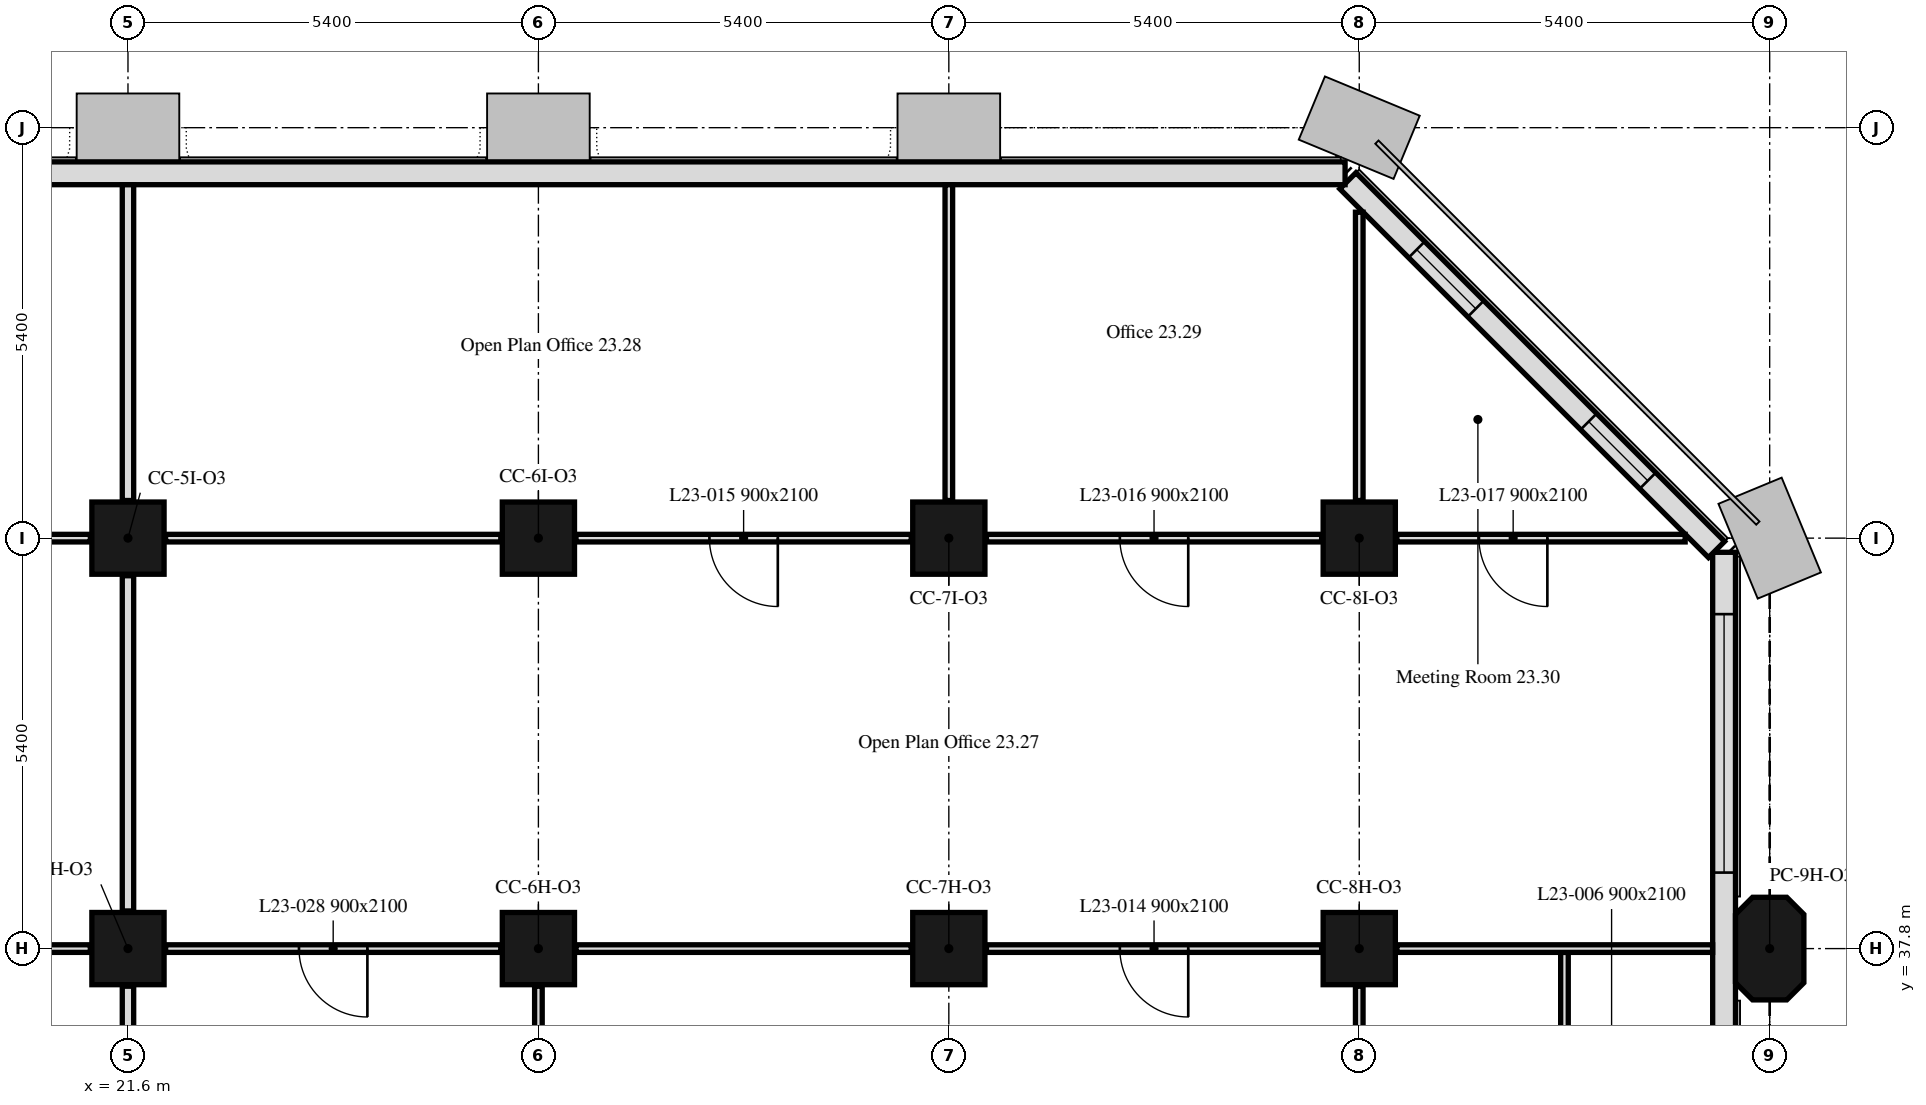
"""IFC4 building model, lengths in metres.
Left out: names, types, materials, properties, quantities, classifications, styles, units other than length and angle.
Written with IfcOpenShell. Run it as: python <this file> out.ifc"""

import sys

from ifc_helpers import new_model, si_unit, direction, frame, frame_2d, origin, origin_2d, place, context, subcontext, project, spatial, polyline, rectangle, outline, extrude, element, fill, save


model = new_model("IFC4")
c1 = context("Model", 3, precision=1e-05, world=origin(), true_north=direction((0.0, 1.0)))
c2 = subcontext(c1, "Body", "Model", "MODEL_VIEW")
j1 = project(units=[si_unit("LENGTHUNIT", "METRE"), si_unit("PLANEANGLEUNIT", "RADIAN")], contexts=[c1])
p1 = place(None, origin())
s1 = spatial("IfcSite", under=j1, at=p1, CompositionType="ELEMENT")
p2 = place(p1, origin())
s2 = spatial("IfcBuilding", under=s1, at=p2, CompositionType="ELEMENT")
p3 = place(p2, frame((0.0, 0.0, 99.2)))
s3 = spatial("IfcBuildingStorey", under=s2, at=p3, CompositionType="ELEMENT", Elevation=99.2)
for number, where, z_axis, x_axis in (
    (1, (21.6, 37.8, 0.0), (0.0, 0.0, 1.0), (1.0, 0.0, 0.0)),
    (2, (27.0, 37.8, 0.0), (0.0, 0.0, 1.0), (1.0, 0.0, 0.0)),
    (3, (32.4, 37.8, 0.0), (0.0, 0.0, 1.0), (1.0, 0.0, 0.0)),
    (4, (37.8, 37.8, 0.0), (0.0, 0.0, 1.0), (1.0, 0.0, 0.0)),
):
    element("IfcColumn", number, at=place(p3, frame(where, z_axis=z_axis, x_axis=x_axis)), inside=s3, PredefinedType="COLUMN", context=c2, shape_type="SweptSolid", body=[
        extrude(rectangle(XDim=0.95, YDim=0.95, at=origin_2d()), origin(), (0.0, 0.0, 1.0), 3.5),
    ])
p4 = place(p3, frame((43.2, 37.8, 0.0), z_axis=(0.0, 0.0, 1.0), x_axis=(0.0, 1.0, 0.0)))
e5 = element("IfcColumn", 5, at=p4, inside=s3, PredefinedType="COLUMN", context=c2, shape_type="SweptSolid", body=[
    extrude(outline(polyline([(-0.45, -0.45), (0.45, -0.45), (0.675, -0.225), (0.675, 0.225), (0.45, 0.45), (-0.45, 0.45), (-0.675, 0.225), (-0.675, -0.225), (-0.45, -0.45)])), origin(), (0.0, 0.0, 1.0), 3.5),
])
for number, where, z_axis, x_axis in (
    (6, (21.6, 43.2, 0.0), (0.0, 0.0, 1.0), (1.0, 0.0, 0.0)),
    (7, (27.0, 43.2, 0.0), (0.0, 0.0, 1.0), (1.0, 0.0, 0.0)),
    (8, (32.4, 43.2, 0.0), (0.0, 0.0, 1.0), (1.0, 0.0, 0.0)),
    (9, (37.8, 43.2, 0.0), (0.0, 0.0, 1.0), (1.0, 0.0, 0.0)),
):
    element("IfcColumn", number, at=place(p3, frame(where, z_axis=z_axis, x_axis=x_axis)), inside=s3, PredefinedType="COLUMN", context=c2, shape_type="SweptSolid", body=[
        extrude(rectangle(XDim=0.95, YDim=0.95, at=origin_2d()), origin(), (0.0, 0.0, 1.0), 3.5),
    ])
p5 = place(p3, frame((42.6, 32.4, 0.0), z_axis=(0.0, 0.0, 1.0), x_axis=(0.0, 1.0, 0.0)))
e10 = element("IfcWall", 10, at=p5, inside=s3, PredefinedType="SOLIDWALL", context=c2, shape_type="SweptSolid", body=[
    extrude(rectangle(XDim=10.614, YDim=0.3, at=frame_2d((5.307, 0.0))), origin(), (0.0, 0.0, 1.0), 3.5),
])
p6 = place(p5, frame((6.4, 0.0, 0.9)))
e11 = element("IfcOpeningElement", 11, at=p6, cuts=e10, PredefinedType="OPENING", context=c2, shape_type="SweptSolid", body=[
    extrude(rectangle(XDim=3.4, YDim=1.7, at=frame_2d((1.7, 0.85))), frame((0.0, 0.16, 0.0), z_axis=(0.0, -1.0, 0.0), x_axis=(1.0, 0.0, 0.0)), (0.0, 0.0, 1.0), 0.32),
])
p7 = place(p3, frame((42.501, 43.051, 0.0), z_axis=(0.0, 0.0, 1.0), x_axis=(-0.707106781187, 0.707106781187, 0.0)))
e12 = element("IfcWall", 12, at=p7, inside=s3, PredefinedType="SOLIDWALL", context=c2, shape_type="SweptSolid", body=[
    extrude(rectangle(XDim=6.86, YDim=0.3, at=frame_2d((3.43, 0.0))), origin(), (0.0, 0.0, 1.0), 3.5),
])
p8 = place(p7, frame((1.28, 0.0, 0.9)))
e13 = element("IfcOpeningElement", 13, at=p8, cuts=e12, PredefinedType="OPENING", context=c2, shape_type="SweptSolid", body=[
    extrude(rectangle(XDim=1.1, YDim=1.7, at=frame_2d((0.55, 0.85))), frame((0.0, 0.16, 0.0), z_axis=(0.0, -1.0, 0.0), x_axis=(1.0, 0.0, 0.0)), (0.0, 0.0, 1.0), 0.32),
])
p9 = place(p7, frame((4.48, 0.0, 0.9)))
e14 = element("IfcOpeningElement", 14, at=p9, cuts=e12, PredefinedType="OPENING", context=c2, shape_type="SweptSolid", body=[
    extrude(rectangle(XDim=1.1, YDim=1.7, at=frame_2d((0.55, 0.85))), frame((0.0, 0.16, 0.0), z_axis=(0.0, -1.0, 0.0), x_axis=(1.0, 0.0, 0.0)), (0.0, 0.0, 1.0), 0.32),
])
p10 = place(p3, frame((37.614, 48.0, 0.0), z_axis=(0.0, 0.0, 1.0), x_axis=(-1.0, 0.0, 0.0)))
e15 = element("IfcWall", 15, at=p10, inside=s3, PredefinedType="SOLIDWALL", context=c2, shape_type="SweptSolid", body=[
    extrude(rectangle(XDim=32.027, YDim=0.3, at=frame_2d((16.014, 0.0))), origin(), (0.0, 0.0, 1.0), 3.5),
])
p11 = place(p10, frame((27.814, 0.0, 0.9)))
e16 = element("IfcOpeningElement", 16, at=p11, cuts=e15, PredefinedType="OPENING", context=c2, shape_type="SweptSolid", body=[
    extrude(rectangle(XDim=3.4, YDim=1.7, at=frame_2d((1.7, 0.85))), frame((0.0, 0.16, 0.0), z_axis=(0.0, -1.0, 0.0), x_axis=(1.0, 0.0, 0.0)), (0.0, 0.0, 1.0), 0.32),
])
p12 = place(p3, frame((21.6, 35.175, 0.0), z_axis=(0.0, 0.0, 1.0), x_axis=(0.0, 1.0, 0.0)))
e17 = element("IfcWall", 17, at=p12, inside=s3, PredefinedType="PARTITIONING", context=c2, shape_type="SweptSolid", body=[
    extrude(rectangle(XDim=2.13, YDim=0.15, at=frame_2d((1.065, 0.0))), origin(), (0.0, 0.0, 1.0), 2.75),
])
p13 = place(p3, frame((21.105, 37.8, 0.0), z_axis=(0.0, 0.0, 1.0), x_axis=(-1.0, 0.0, 0.0)))
e18 = element("IfcWall", 18, at=p13, inside=s3, PredefinedType="PARTITIONING", context=c2, shape_type="SweptSolid", body=[
    extrude(rectangle(XDim=4.41, YDim=0.1, at=frame_2d((2.205, 0.0))), origin(), (0.0, 0.0, 1.0), 3.5),
])
p14 = place(p3, frame((21.6, 38.295, 0.0), z_axis=(0.0, 0.0, 1.0), x_axis=(0.0, 1.0, 0.0)))
e19 = element("IfcWall", 19, at=p14, inside=s3, PredefinedType="PARTITIONING", context=c2, shape_type="SweptSolid", body=[
    extrude(rectangle(XDim=4.41, YDim=0.15, at=frame_2d((2.205, 0.0))), origin(), (0.0, 0.0, 1.0), 2.75),
])
p15 = place(p3, frame((21.105, 43.2, 0.0), z_axis=(0.0, 0.0, 1.0), x_axis=(-1.0, 0.0, 0.0)))
e20 = element("IfcWall", 20, at=p15, inside=s3, PredefinedType="PARTITIONING", context=c2, shape_type="SweptSolid", body=[
    extrude(rectangle(XDim=4.41, YDim=0.1, at=frame_2d((2.205, 0.0))), origin(), (0.0, 0.0, 1.0), 3.5),
])
p16 = place(p15, frame((1.755, 0.0, 0.0)))
e21 = element("IfcOpeningElement", 21, at=p16, cuts=e20, PredefinedType="OPENING", context=c2, shape_type="SweptSolid", body=[
    extrude(rectangle(XDim=0.9, YDim=2.1, at=frame_2d((0.45, 1.05))), frame((0.0, 0.05, 0.0), z_axis=(0.0, -1.0, 0.0), x_axis=(1.0, 0.0, 0.0)), (0.0, 0.0, 1.0), 0.1),
])
p17 = place(p3, frame((21.6, 47.849, 0.0), z_axis=(0.0, 0.0, 1.0), x_axis=(0.0, -1.0, 0.0)))
e22 = element("IfcWall", 22, at=p17, inside=s3, PredefinedType="PARTITIONING", context=c2, shape_type="SweptSolid", body=[
    extrude(rectangle(XDim=4.154, YDim=0.15, at=frame_2d((2.077, 0.0))), origin(), (0.0, 0.0, 1.0), 2.75),
])
p18 = place(p3, frame((27.0, 35.175, 0.0), z_axis=(0.0, 0.0, 1.0), x_axis=(0.0, 1.0, 0.0)))
e23 = element("IfcWall", 23, at=p18, inside=s3, PredefinedType="PARTITIONING", context=c2, shape_type="SweptSolid", body=[
    extrude(rectangle(XDim=2.13, YDim=0.1, at=frame_2d((1.065, 0.0))), origin(), (0.0, 0.0, 1.0), 2.75),
])
p19 = place(p3, frame((26.505, 37.8, 0.0), z_axis=(0.0, 0.0, 1.0), x_axis=(-1.0, 0.0, 0.0)))
e24 = element("IfcWall", 24, at=p19, inside=s3, PredefinedType="PARTITIONING", context=c2, shape_type="SweptSolid", body=[
    extrude(rectangle(XDim=4.41, YDim=0.1, at=frame_2d((2.205, 0.0))), origin(), (0.0, 0.0, 1.0), 3.5),
])
p20 = place(p19, frame((1.755, 0.0, 0.0)))
e25 = element("IfcOpeningElement", 25, at=p20, cuts=e24, PredefinedType="OPENING", context=c2, shape_type="SweptSolid", body=[
    extrude(rectangle(XDim=0.9, YDim=2.1, at=frame_2d((0.45, 1.05))), frame((0.0, 0.05, 0.0), z_axis=(0.0, -1.0, 0.0), x_axis=(1.0, 0.0, 0.0)), (0.0, 0.0, 1.0), 0.1),
])
p21 = place(p3, frame((37.8, 35.175, 0.0), z_axis=(0.0, 0.0, 1.0), x_axis=(0.0, 1.0, 0.0)))
e26 = element("IfcWall", 26, at=p21, inside=s3, PredefinedType="PARTITIONING", context=c2, shape_type="SweptSolid", body=[
    extrude(rectangle(XDim=2.13, YDim=0.1, at=frame_2d((1.065, 0.0))), origin(), (0.0, 0.0, 1.0), 3.5),
])
p22 = place(p3, frame((37.305, 37.8, 0.0), z_axis=(0.0, 0.0, 1.0), x_axis=(-1.0, 0.0, 0.0)))
e27 = element("IfcWall", 27, at=p22, inside=s3, PredefinedType="PARTITIONING", context=c2, shape_type="SweptSolid", body=[
    extrude(rectangle(XDim=4.41, YDim=0.1, at=frame_2d((2.205, 0.0))), origin(), (0.0, 0.0, 1.0), 3.5),
])
p23 = place(p22, frame((1.755, 0.0, 0.0)))
e28 = element("IfcOpeningElement", 28, at=p23, cuts=e27, PredefinedType="OPENING", context=c2, shape_type="SweptSolid", body=[
    extrude(rectangle(XDim=0.9, YDim=2.1, at=frame_2d((0.45, 1.05))), frame((0.0, 0.05, 0.0), z_axis=(0.0, -1.0, 0.0), x_axis=(1.0, 0.0, 0.0)), (0.0, 0.0, 1.0), 0.1),
])
p24 = place(p3, frame((31.905, 37.8, 0.0), z_axis=(0.0, 0.0, 1.0), x_axis=(-1.0, 0.0, 0.0)))
e29 = element("IfcWall", 29, at=p24, inside=s3, PredefinedType="PARTITIONING", context=c2, shape_type="SweptSolid", body=[
    extrude(rectangle(XDim=4.41, YDim=0.1, at=frame_2d((2.205, 0.0))), origin(), (0.0, 0.0, 1.0), 3.5),
])
p25 = place(p3, frame((40.5, 35.175, 0.0), z_axis=(0.0, 0.0, 1.0), x_axis=(0.0, 1.0, 0.0)))
e30 = element("IfcWall", 30, at=p25, inside=s3, PredefinedType="PARTITIONING", context=c2, shape_type="SweptSolid", body=[
    extrude(rectangle(XDim=2.575, YDim=0.1, at=frame_2d((1.288, 0.0))), origin(), (0.0, 0.0, 1.0), 3.5),
])
p26 = place(p3, frame((42.449, 37.8, 0.0), z_axis=(0.0, 0.0, 1.0), x_axis=(-1.0, 0.0, 0.0)))
e31 = element("IfcWall", 31, at=p26, inside=s3, PredefinedType="PARTITIONING", context=c2, shape_type="SweptSolid", body=[
    extrude(rectangle(XDim=4.154, YDim=0.1, at=frame_2d((2.077, 0.0))), origin(), (0.0, 0.0, 1.0), 3.5),
])
p27 = place(p3, frame((42.088, 43.2, 0.0), z_axis=(0.0, 0.0, 1.0), x_axis=(-1.0, 0.0, 0.0)))
e32 = element("IfcWall", 32, at=p27, inside=s3, PredefinedType="PARTITIONING", context=c2, shape_type="SweptSolid", body=[
    extrude(rectangle(XDim=3.793, YDim=0.1, at=frame_2d((1.896, 0.0))), origin(), (0.0, 0.0, 1.0), 3.5),
])
p28 = place(p27, frame((1.813, 0.0, 0.0)))
e33 = element("IfcOpeningElement", 33, at=p28, cuts=e32, PredefinedType="OPENING", context=c2, shape_type="SweptSolid", body=[
    extrude(rectangle(XDim=0.9, YDim=2.1, at=frame_2d((0.45, 1.05))), frame((0.0, 0.05, 0.0), z_axis=(0.0, -1.0, 0.0), x_axis=(1.0, 0.0, 0.0)), (0.0, 0.0, 1.0), 0.1),
])
p29 = place(p3, frame((37.305, 43.2, 0.0), z_axis=(0.0, 0.0, 1.0), x_axis=(-1.0, 0.0, 0.0)))
e34 = element("IfcWall", 34, at=p29, inside=s3, PredefinedType="PARTITIONING", context=c2, shape_type="SweptSolid", body=[
    extrude(rectangle(XDim=4.41, YDim=0.1, at=frame_2d((2.205, 0.0))), origin(), (0.0, 0.0, 1.0), 3.5),
])
p30 = place(p29, frame((1.755, 0.0, 0.0)))
e35 = element("IfcOpeningElement", 35, at=p30, cuts=e34, PredefinedType="OPENING", context=c2, shape_type="SweptSolid", body=[
    extrude(rectangle(XDim=0.9, YDim=2.1, at=frame_2d((0.45, 1.05))), frame((0.0, 0.05, 0.0), z_axis=(0.0, -1.0, 0.0), x_axis=(1.0, 0.0, 0.0)), (0.0, 0.0, 1.0), 0.1),
])
p31 = place(p3, frame((31.905, 43.2, 0.0), z_axis=(0.0, 0.0, 1.0), x_axis=(-1.0, 0.0, 0.0)))
e36 = element("IfcWall", 36, at=p31, inside=s3, PredefinedType="PARTITIONING", context=c2, shape_type="SweptSolid", body=[
    extrude(rectangle(XDim=4.41, YDim=0.1, at=frame_2d((2.205, 0.0))), origin(), (0.0, 0.0, 1.0), 3.5),
])
p32 = place(p31, frame((1.755, 0.0, 0.0)))
e37 = element("IfcOpeningElement", 37, at=p32, cuts=e36, PredefinedType="OPENING", context=c2, shape_type="SweptSolid", body=[
    extrude(rectangle(XDim=0.9, YDim=2.1, at=frame_2d((0.45, 1.05))), frame((0.0, 0.05, 0.0), z_axis=(0.0, -1.0, 0.0), x_axis=(1.0, 0.0, 0.0)), (0.0, 0.0, 1.0), 0.1),
])
p33 = place(p3, frame((26.505, 43.2, 0.0), z_axis=(0.0, 0.0, 1.0), x_axis=(-1.0, 0.0, 0.0)))
e38 = element("IfcWall", 38, at=p33, inside=s3, PredefinedType="PARTITIONING", context=c2, shape_type="SweptSolid", body=[
    extrude(rectangle(XDim=4.41, YDim=0.1, at=frame_2d((2.205, 0.0))), origin(), (0.0, 0.0, 1.0), 3.5),
])
p34 = place(p3, frame((32.4, 47.849, 0.0), z_axis=(0.0, 0.0, 1.0), x_axis=(0.0, -1.0, 0.0)))
e39 = element("IfcWall", 39, at=p34, inside=s3, PredefinedType="PARTITIONING", context=c2, shape_type="SweptSolid", body=[
    extrude(rectangle(XDim=4.154, YDim=0.1, at=frame_2d((2.077, 0.0))), origin(), (0.0, 0.0, 1.0), 2.75),
])
p35 = place(p3, frame((37.8, 43.695, 0.0), z_axis=(0.0, 0.0, 1.0), x_axis=(0.0, 1.0, 0.0)))
e40 = element("IfcWall", 40, at=p35, inside=s3, PredefinedType="PARTITIONING", context=c2, shape_type="SweptSolid", body=[
    extrude(rectangle(XDim=3.793, YDim=0.1, at=frame_2d((1.896, 0.0))), origin(), (0.0, 0.0, 1.0), 3.5),
])
p36 = place(p6, origin())
e41 = element("IfcWindow", 41, at=p36, inside=s3, PartitioningType="SINGLE_PANEL", PredefinedType="WINDOW", context=c2, shape_type="SweptSolid", body=[
    extrude(rectangle(XDim=3.4, YDim=1.7, at=frame_2d((1.7, 0.85))), frame((0.0, 0.03, 0.0), z_axis=(0.0, -1.0, 0.0), x_axis=(1.0, 0.0, 0.0)), (0.0, 0.0, 1.0), 0.06),
])
fill(e11, e41)
p37 = place(p8, origin())
e42 = element("IfcWindow", 42, at=p37, inside=s3, PartitioningType="SINGLE_PANEL", PredefinedType="WINDOW", context=c2, shape_type="SweptSolid", body=[
    extrude(rectangle(XDim=1.1, YDim=1.7, at=frame_2d((0.55, 0.85))), frame((0.0, 0.03, 0.0), z_axis=(0.0, -1.0, 0.0), x_axis=(1.0, 0.0, 0.0)), (0.0, 0.0, 1.0), 0.06),
])
fill(e13, e42)
p38 = place(p9, origin())
e43 = element("IfcWindow", 43, at=p38, inside=s3, PartitioningType="SINGLE_PANEL", PredefinedType="WINDOW", context=c2, shape_type="SweptSolid", body=[
    extrude(rectangle(XDim=1.1, YDim=1.7, at=frame_2d((0.55, 0.85))), frame((0.0, 0.03, 0.0), z_axis=(0.0, -1.0, 0.0), x_axis=(1.0, 0.0, 0.0)), (0.0, 0.0, 1.0), 0.06),
])
fill(e14, e43)
p39 = place(p23, origin())
e44 = element("IfcDoor", 44, at=p39, inside=s3, OperationType="SINGLE_SWING_LEFT", PredefinedType="DOOR", context=c2, shape_type="SweptSolid", body=[
    extrude(rectangle(XDim=0.9, YDim=2.1, at=frame_2d((0.45, 1.05))), frame((0.0, 0.025, 0.0), z_axis=(0.0, -1.0, 0.0), x_axis=(1.0, 0.0, 0.0)), (0.0, 0.0, 1.0), 0.05),
])
fill(e28, e44)
p40 = place(p32, origin())
e45 = element("IfcDoor", 45, at=p40, inside=s3, OperationType="SINGLE_SWING_LEFT", PredefinedType="DOOR", context=c2, shape_type="SweptSolid", body=[
    extrude(rectangle(XDim=0.9, YDim=2.1, at=frame_2d((0.45, 1.05))), frame((0.0, 0.025, 0.0), z_axis=(0.0, -1.0, 0.0), x_axis=(1.0, 0.0, 0.0)), (0.0, 0.0, 1.0), 0.05),
])
fill(e37, e45)
p41 = place(p30, origin())
e46 = element("IfcDoor", 46, at=p41, inside=s3, OperationType="SINGLE_SWING_LEFT", PredefinedType="DOOR", context=c2, shape_type="SweptSolid", body=[
    extrude(rectangle(XDim=0.9, YDim=2.1, at=frame_2d((0.45, 1.05))), frame((0.0, 0.025, 0.0), z_axis=(0.0, -1.0, 0.0), x_axis=(1.0, 0.0, 0.0)), (0.0, 0.0, 1.0), 0.05),
])
fill(e35, e46)
p42 = place(p28, origin())
e47 = element("IfcDoor", 47, at=p42, inside=s3, OperationType="SINGLE_SWING_LEFT", PredefinedType="DOOR", context=c2, shape_type="SweptSolid", body=[
    extrude(rectangle(XDim=0.9, YDim=2.1, at=frame_2d((0.45, 1.05))), frame((0.0, 0.025, 0.0), z_axis=(0.0, -1.0, 0.0), x_axis=(1.0, 0.0, 0.0)), (0.0, 0.0, 1.0), 0.05),
])
fill(e33, e47)
p43 = place(p20, origin())
e48 = element("IfcDoor", 48, at=p43, inside=s3, OperationType="SINGLE_SWING_RIGHT", PredefinedType="DOOR", context=c2, shape_type="SweptSolid", body=[
    extrude(rectangle(XDim=0.9, YDim=2.1, at=frame_2d((0.45, 1.05))), frame((0.0, 0.025, 0.0), z_axis=(0.0, -1.0, 0.0), x_axis=(1.0, 0.0, 0.0)), (0.0, 0.0, 1.0), 0.05),
])
fill(e25, e48)
save(model, sys.argv[1])
